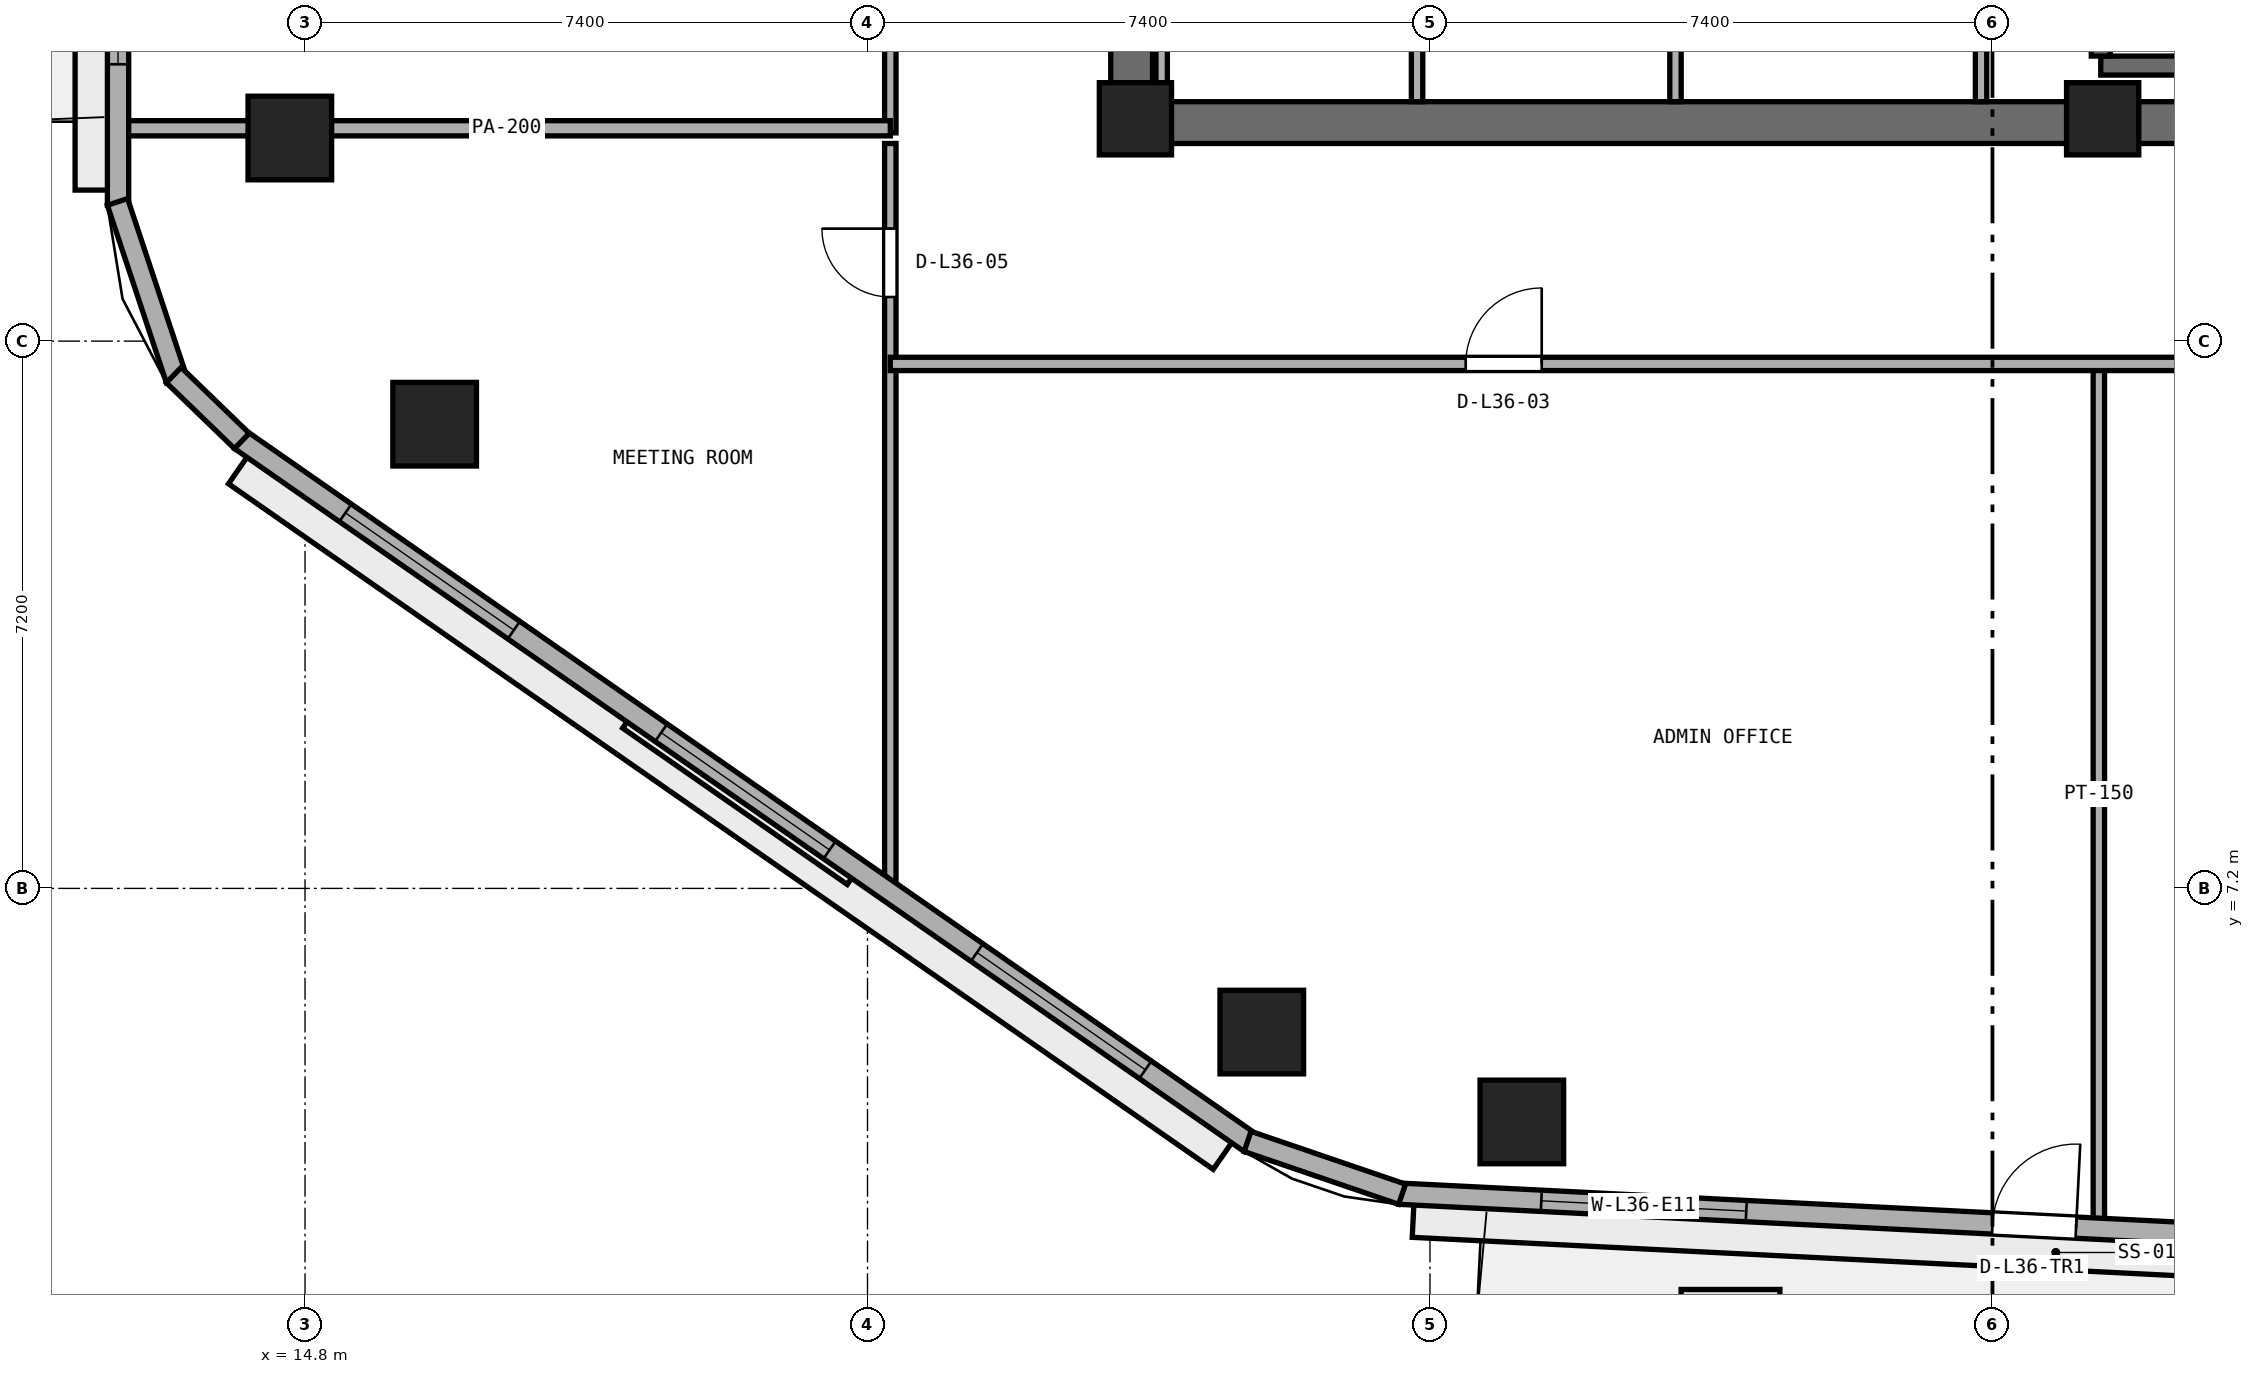
"""IFC4 building model, lengths in metres.
Left out: names, types, materials, properties, quantities, classifications, styles, units other than length and angle.
Written with IfcOpenShell. Run it as: python <this file> out.ifc"""

import sys

from ifc_helpers import new_model, si_unit, direction, frame, frame_2d, origin, origin_2d, place, context, subcontext, project, spatial, rectangle, extrude, element, fill, save


model = new_model("IFC4")
c1 = context("Model", 3, precision=1e-05, world=origin(), true_north=direction((0.0, 1.0)))
c2 = subcontext(c1, "Body", "Model", "MODEL_VIEW")
j1 = project(units=[si_unit("LENGTHUNIT", "METRE"), si_unit("PLANEANGLEUNIT", "RADIAN")], contexts=[c1])
p1 = place(None, origin())
s1 = spatial("IfcSite", under=j1, at=p1, CompositionType="ELEMENT")
p2 = place(p1, origin())
s2 = spatial("IfcBuilding", under=s1, at=p2, CompositionType="ELEMENT")
p3 = place(p2, frame((0.0, 0.0, 144.0)))
s3 = spatial("IfcBuildingStorey", under=s2, at=p3, CompositionType="ELEMENT", Elevation=144.0)
p4 = place(p3, frame((25.4, 17.275, 0.0), z_axis=(0.0, 0.0, 1.0), x_axis=(1.0, 0.0, 0.0)))
e1 = element("IfcWall", 1, at=p4, inside=s3, PredefinedType="SHEAR", context=c2, shape_type="SweptSolid", body=[
    extrude(rectangle(XDim=23.2, YDim=0.55, at=frame_2d((11.6, 0.0))), origin(), (0.0, 0.0, 1.0), 3.54),
])
p5 = place(p3, frame((25.675, 17.55, 0.0), z_axis=(0.0, 0.0, 1.0), x_axis=(0.0, 1.0, 0.0)))
e2 = element("IfcWall", 2, at=p5, inside=s3, PredefinedType="SHEAR", context=c2, shape_type="SweptSolid", body=[
    extrude(rectangle(XDim=15.3, YDim=0.55, at=frame_2d((7.65, 0.0))), origin(), (0.0, 0.0, 1.0), 3.54),
])
p6 = place(p5, frame((6.9, 0.0, 0.0)))
e3 = element("IfcOpeningElement", 3, at=p6, cuts=e2, PredefinedType="OPENING", context=c2, shape_type="SweptSolid", body=[
    extrude(rectangle(XDim=1.5, YDim=2.15, at=frame_2d((0.75, 1.075))), frame((0.0, 0.285, 0.0), z_axis=(0.0, -1.0, 0.0), x_axis=(1.0, 0.0, 0.0)), (0.0, 0.0, 1.0), 0.57),
])
for number, where, z_axis, x_axis in (
    (4, (25.725, 17.325, 0.0), (0.0, 0.0, 1.0), (1.0, 0.0, 0.0)),
    (5, (38.45, 17.325, 0.0), (0.0, 0.0, 1.0), (1.0, 0.0, 0.0)),
):
    element("IfcColumn", number, at=place(p3, frame(where, z_axis=z_axis, x_axis=x_axis)), inside=s3, PredefinedType="PILASTER", context=c2, shape_type="SweptSolid", body=[
        extrude(rectangle(XDim=0.95, YDim=0.95, at=origin_2d()), origin(), (0.0, 0.0, 1.0), 3.8),
    ])
for number, where, z_axis, x_axis in (
    (6, (30.809, 4.127, 0.0), (0.0, 0.0, 1.0), (1.0, 0.0, 0.0)),
    (7, (14.6, 17.072, 0.0), (0.0, 0.0, 1.0), (1.0, 0.0, 0.0)),
    (8, (16.505, 13.307, 0.0), (0.0, 0.0, 1.0), (1.0, 0.0, 0.0)),
    (9, (27.387, 5.31, 0.0), (0.0, 0.0, 1.0), (1.0, 0.0, 0.0)),
):
    element("IfcColumn", number, at=place(p3, frame(where, z_axis=z_axis, x_axis=x_axis)), inside=s3, PredefinedType="COLUMN", context=c2, shape_type="SweptSolid", body=[
        extrude(rectangle(XDim=1.1, YDim=1.1, at=origin_2d()), origin(), (0.0, 0.0, 1.0), 3.8),
    ])
p7 = place(p3, frame((38.425, 18.025, 0.0), z_axis=(0.0, 0.0, 1.0), x_axis=(1.0, 0.0, 0.0)))
e10 = element("IfcWall", 10, at=p7, inside=s3, PredefinedType="SHEAR", context=c2, shape_type="SweptSolid", body=[
    extrude(rectangle(XDim=7.3, YDim=0.25, at=frame_2d((3.65, 0.0))), origin(), (0.0, 0.0, 1.0), 3.54),
])
p8 = place(p3, frame((38.425, 18.15, 0.0), z_axis=(0.0, 0.0, 1.0), x_axis=(0.0, 1.0, 0.0)))
e11 = element("IfcWall", 11, at=p8, inside=s3, PredefinedType="SHEAR", context=c2, shape_type="SweptSolid", body=[
    extrude(rectangle(XDim=3.2, YDim=0.25, at=frame_2d((1.6, 0.0))), origin(), (0.0, 0.0, 1.0), 3.54),
])
p9 = place(p8, frame((0.35, 0.0, 0.0)))
e12 = element("IfcOpeningElement", 12, at=p9, cuts=e11, PredefinedType="OPENING", context=c2, shape_type="SweptSolid", body=[
    extrude(rectangle(XDim=1.1, YDim=2.15, at=frame_2d((0.55, 1.075))), frame((0.0, 0.135, 0.0), z_axis=(0.0, -1.0, 0.0), x_axis=(1.0, 0.0, 0.0)), (0.0, 0.0, 1.0), 0.27),
])
p10 = place(p3, frame((26.07, 17.55, 0.0), z_axis=(0.0, 0.0, 1.0), x_axis=(0.0, 1.0, 0.0)))
e13 = element("IfcWall", 13, at=p10, inside=s3, PredefinedType="PARTITIONING", context=c2, shape_type="SweptSolid", body=[
    extrude(rectangle(XDim=2.2, YDim=0.15, at=frame_2d((1.1, 0.0))), origin(), (0.0, 0.0, 1.0), 2.64),
])
for number, where, z_axis, x_axis in (
    (14, (29.43, 17.55, 0.0), (0.0, 0.0, 1.0), (0.0, 1.0, 0.0)),
    (15, (32.83, 17.55, 0.0), (0.0, 0.0, 1.0), (0.0, 1.0, 0.0)),
    (16, (36.85, 17.55, 0.0), (0.0, 0.0, 1.0), (0.0, 1.0, 0.0)),
):
    element("IfcWall", number, at=place(p3, frame(where, z_axis=z_axis, x_axis=x_axis)), inside=s3, PredefinedType="PARTITIONING", context=c2, shape_type="SweptSolid", body=[
        extrude(rectangle(XDim=2.2, YDim=0.15, at=frame_2d((1.1, 0.0))), origin(), (0.0, 0.0, 1.0), 3.54),
    ])
p11 = place(p3, frame((38.4, 2.787, 0.0), z_axis=(0.0, 0.0, 1.0), x_axis=(0.0, 1.0, 0.0)))
e17 = element("IfcWall", 17, at=p11, inside=s3, PredefinedType="PARTITIONING", context=c2, shape_type="SweptSolid", body=[
    extrude(rectangle(XDim=11.313, YDim=0.15, at=frame_2d((5.657, 0.0))), origin(), (0.0, 0.0, 1.0), 3.54),
])
p12 = place(p3, frame((22.5, 7.119, 0.0), z_axis=(0.0, 0.0, 1.0), x_axis=(0.0, 1.0, 0.0)))
e18 = element("IfcWall", 18, at=p12, inside=s3, PredefinedType="PARTITIONING", context=c2, shape_type="SweptSolid", body=[
    extrude(rectangle(XDim=9.881, YDim=0.15, at=frame_2d((4.94, 0.0))), origin(), (0.0, 0.0, 1.0), 3.54),
])
p13 = place(p12, frame((7.861, 0.0, 0.0)))
e19 = element("IfcOpeningElement", 19, at=p13, cuts=e18, PredefinedType="OPENING", context=c2, shape_type="SweptSolid", body=[
    extrude(rectangle(XDim=0.9, YDim=2.1, at=frame_2d((0.45, 1.05))), frame((0.0, 0.085, 0.0), z_axis=(0.0, -1.0, 0.0), x_axis=(1.0, 0.0, 0.0)), (0.0, 0.0, 1.0), 0.17),
])
p14 = place(p3, frame((22.5, 17.14, 0.0), z_axis=(0.0, 0.0, 1.0), x_axis=(0.0, 1.0, 0.0)))
e20 = element("IfcWall", 20, at=p14, inside=s3, PredefinedType="PARTITIONING", context=c2, shape_type="SweptSolid", body=[
    extrude(rectangle(XDim=6.71, YDim=0.15, at=frame_2d((3.355, 0.0))), origin(), (0.0, 0.0, 1.0), 3.54),
])
p15 = place(p3, frame((22.5, 14.1, 0.0), z_axis=(0.0, 0.0, 1.0), x_axis=(1.0, 0.0, 0.0)))
e21 = element("IfcWall", 21, at=p15, inside=s3, PredefinedType="PARTITIONING", context=c2, shape_type="SweptSolid", body=[
    extrude(rectangle(XDim=29.0, YDim=0.175, at=frame_2d((14.5, 0.0))), origin(), (0.0, 0.0, 1.0), 3.54),
])
p16 = place(p15, frame((7.57, 0.0, 0.0)))
e22 = element("IfcOpeningElement", 22, at=p16, cuts=e21, PredefinedType="OPENING", context=c2, shape_type="SweptSolid", body=[
    extrude(rectangle(XDim=1.0, YDim=2.12, at=frame_2d((0.5, 1.06))), frame((0.0, 0.097, 0.0), z_axis=(0.0, -1.0, 0.0), x_axis=(1.0, 0.0, 0.0)), (0.0, 0.0, 1.0), 0.195),
])
p17 = place(p15, frame((21.88, 0.0, 0.0)))
e23 = element("IfcOpeningElement", 23, at=p17, cuts=e21, PredefinedType="OPENING", context=c2, shape_type="SweptSolid", body=[
    extrude(rectangle(XDim=0.9, YDim=2.1, at=frame_2d((0.45, 1.05))), frame((0.0, 0.097, 0.0), z_axis=(0.0, -1.0, 0.0), x_axis=(1.0, 0.0, 0.0)), (0.0, 0.0, 1.0), 0.195),
])
p18 = place(p3, frame((12.405, 17.2, 0.0), z_axis=(0.0, 0.0, 1.0), x_axis=(1.0, 0.0, 0.0)))
e24 = element("IfcWall", 24, at=p18, inside=s3, PredefinedType="PARTITIONING", context=c2, shape_type="SweptSolid", body=[
    extrude(rectangle(XDim=10.095, YDim=0.2, at=frame_2d((5.047, 0.0))), origin(), (0.0, 0.0, 1.0), 2.923),
])
p19 = place(p3, frame((29.195, 3.184, 0.0), z_axis=(0.0, 0.0, 1.0), x_axis=(0.998743400978, -0.05011605535, 0.0)))
e25 = element("IfcWall", 25, at=p19, inside=s3, PredefinedType="STANDARD", context=c2, shape_type="SweptSolid", body=[
    extrude(rectangle(XDim=17.333, YDim=0.28, at=frame_2d((8.667, 0.0))), origin(), (0.0, 0.0, 1.0), 3.54),
])
p20 = place(p19, frame((7.816, 0.0, 0.0)))
e26 = element("IfcOpeningElement", 26, at=p20, cuts=e25, PredefinedType="OPENING", context=c2, shape_type="SweptSolid", body=[
    extrude(rectangle(XDim=1.1, YDim=2.2, at=frame_2d((0.55, 1.1))), frame((0.0, 0.15, 0.0), z_axis=(0.0, -1.0, 0.0), x_axis=(1.0, 0.0, 0.0)), (0.0, 0.0, 1.0), 0.3),
])
p21 = place(p19, frame((1.872, 0.0, 0.9)))
e27 = element("IfcOpeningElement", 27, at=p21, cuts=e25, PredefinedType="OPENING", context=c2, shape_type="SweptSolid", body=[
    extrude(rectangle(XDim=2.7, YDim=1.75, at=frame_2d((1.35, 0.875))), frame((0.0, 0.15, 0.0), z_axis=(0.0, -1.0, 0.0), x_axis=(1.0, 0.0, 0.0)), (0.0, 0.0, 1.0), 0.3),
])
p22 = place(p19, frame((12.76, 0.0, 0.9)))
e28 = element("IfcOpeningElement", 28, at=p22, cuts=e25, PredefinedType="OPENING", context=c2, shape_type="SweptSolid", body=[
    extrude(rectangle(XDim=2.7, YDim=1.75, at=frame_2d((1.35, 0.875))), frame((0.0, 0.15, 0.0), z_axis=(0.0, -1.0, 0.0), x_axis=(1.0, 0.0, 0.0)), (0.0, 0.0, 1.0), 0.3),
])
p23 = place(p3, frame((12.34, 33.419, 0.0), z_axis=(0.0, 0.0, 1.0), x_axis=(0.0, -1.0, 0.0)))
e29 = element("IfcWall", 29, at=p23, inside=s3, PredefinedType="STANDARD", context=c2, shape_type="SweptSolid", body=[
    extrude(rectangle(XDim=17.232, YDim=0.28, at=frame_2d((8.616, 0.0))), origin(), (0.0, 0.0, 1.0), 3.54),
])
p24 = place(p23, frame((8.066, 0.0, 0.0)))
e30 = element("IfcOpeningElement", 30, at=p24, cuts=e29, PredefinedType="OPENING", context=c2, shape_type="SweptSolid", body=[
    extrude(rectangle(XDim=1.1, YDim=2.2, at=frame_2d((0.55, 1.1))), frame((0.0, 0.15, 0.0), z_axis=(0.0, -1.0, 0.0), x_axis=(1.0, 0.0, 0.0)), (0.0, 0.0, 1.0), 0.3),
])
p25 = place(p23, frame((12.677, 0.0, 0.9)))
e31 = element("IfcOpeningElement", 31, at=p25, cuts=e29, PredefinedType="OPENING", context=c2, shape_type="SweptSolid", body=[
    extrude(rectangle(XDim=2.7, YDim=1.75, at=frame_2d((1.35, 0.875))), frame((0.0, 0.15, 0.0), z_axis=(0.0, -1.0, 0.0), x_axis=(1.0, 0.0, 0.0)), (0.0, 0.0, 1.0), 0.3),
])
p26 = place(p3, frame((13.952, 13.101, 0.0), z_axis=(0.0, 0.0, 1.0), x_axis=(0.820698239491, -0.571361881558, 0.0)))
e32 = element("IfcWall", 32, at=p26, inside=s3, PredefinedType="STANDARD", context=c2, shape_type="SweptSolid", body=[
    extrude(rectangle(XDim=16.186, YDim=0.28, at=frame_2d((8.093, 0.0))), origin(), (0.0, 0.0, 1.0), 3.54),
])
p27 = place(p26, frame((1.681, 0.0, 0.9)))
e33 = element("IfcOpeningElement", 33, at=p27, cuts=e32, PredefinedType="OPENING", context=c2, shape_type="SweptSolid", body=[
    extrude(rectangle(XDim=2.7, YDim=1.75, at=frame_2d((1.35, 0.875))), frame((0.0, 0.15, 0.0), z_axis=(0.0, -1.0, 0.0), x_axis=(1.0, 0.0, 0.0)), (0.0, 0.0, 1.0), 0.3),
])
p28 = place(p26, frame((6.743, 0.0, 0.9)))
e34 = element("IfcOpeningElement", 34, at=p28, cuts=e32, PredefinedType="OPENING", context=c2, shape_type="SweptSolid", body=[
    extrude(rectangle(XDim=2.7, YDim=1.75, at=frame_2d((1.35, 0.875))), frame((0.0, 0.15, 0.0), z_axis=(0.0, -1.0, 0.0), x_axis=(1.0, 0.0, 0.0)), (0.0, 0.0, 1.0), 0.3),
])
p29 = place(p26, frame((11.804, 0.0, 0.9)))
e35 = element("IfcOpeningElement", 35, at=p29, cuts=e32, PredefinedType="OPENING", context=c2, shape_type="SweptSolid", body=[
    extrude(rectangle(XDim=2.7, YDim=1.75, at=frame_2d((1.35, 0.875))), frame((0.0, 0.15, 0.0), z_axis=(0.0, -1.0, 0.0), x_axis=(1.0, 0.0, 0.0)), (0.0, 0.0, 1.0), 0.3),
])
p30 = place(p3, frame((12.333, 16.231, 0.0), z_axis=(0.0, 0.0, 1.0), x_axis=(0.315364302967, -0.94897068259, 0.0)))
e36 = element("IfcWall", 36, at=p30, inside=s3, PredefinedType="STANDARD", context=c2, shape_type="SweptSolid", body=[
    extrude(rectangle(XDim=2.46, YDim=0.28, at=frame_2d((1.23, 0.0))), origin(), (0.0, 0.0, 1.0), 3.54),
])
p31 = place(p3, frame((13.073, 13.953, 0.0), z_axis=(0.0, 0.0, 1.0), x_axis=(0.718958999036, -0.695052485576, 0.0)))
e37 = element("IfcWall", 37, at=p31, inside=s3, PredefinedType="STANDARD", context=c2, shape_type="SweptSolid", body=[
    extrude(rectangle(XDim=1.246, YDim=0.28, at=frame_2d((0.623, 0.0))), origin(), (0.0, 0.0, 1.0), 3.54),
])
p32 = place(p3, frame((27.2, 3.871, 0.0), z_axis=(0.0, 0.0, 1.0), x_axis=(0.946327814955, -0.323208395068, 0.0)))
e38 = element("IfcWall", 38, at=p32, inside=s3, PredefinedType="STANDARD", context=c2, shape_type="SweptSolid", body=[
    extrude(rectangle(XDim=2.148, YDim=0.28, at=frame_2d((1.074, 0.0))), origin(), (0.0, 0.0, 1.0), 3.54),
])
p33 = place(p16, origin())
e39 = element("IfcDoor", 39, at=p33, inside=s3, OperationType="SINGLE_SWING_RIGHT", PredefinedType="DOOR", context=c2, shape_type="SweptSolid", body=[
    extrude(rectangle(XDim=1.0, YDim=2.12, at=frame_2d((0.5, 1.06))), frame((0.0, 0.025, 0.0), z_axis=(0.0, -1.0, 0.0), x_axis=(1.0, 0.0, 0.0)), (0.0, 0.0, 1.0), 0.05),
])
fill(e22, e39)
p34 = place(p13, origin())
e40 = element("IfcDoor", 40, at=p34, inside=s3, OperationType="SINGLE_SWING_RIGHT", PredefinedType="DOOR", context=c2, shape_type="SweptSolid", body=[
    extrude(rectangle(XDim=0.9, YDim=2.1, at=frame_2d((0.45, 1.05))), frame((0.0, 0.025, 0.0), z_axis=(0.0, -1.0, 0.0), x_axis=(1.0, 0.0, 0.0)), (0.0, 0.0, 1.0), 0.05),
])
fill(e19, e40)
p35 = place(p20, origin())
e41 = element("IfcDoor", 41, at=p35, inside=s3, OperationType="SINGLE_SWING_RIGHT", PredefinedType="DOOR", context=c2, shape_type="SweptSolid", body=[
    extrude(rectangle(XDim=1.1, YDim=2.2, at=frame_2d((0.55, 1.1))), frame((0.0, 0.025, 0.0), z_axis=(0.0, -1.0, 0.0), x_axis=(1.0, 0.0, 0.0)), (0.0, 0.0, 1.0), 0.05),
])
fill(e26, e41)
p36 = place(p21, origin())
e42 = element("IfcWindow", 42, at=p36, inside=s3, PartitioningType="SINGLE_PANEL", PredefinedType="WINDOW", context=c2, shape_type="SweptSolid", body=[
    extrude(rectangle(XDim=2.7, YDim=1.75, at=frame_2d((1.35, 0.875))), frame((0.0, 0.03, 0.0), z_axis=(0.0, -1.0, 0.0), x_axis=(1.0, 0.0, 0.0)), (0.0, 0.0, 1.0), 0.06),
])
fill(e27, e42)
p37 = place(p25, origin())
e43 = element("IfcWindow", 43, at=p37, inside=s3, PartitioningType="SINGLE_PANEL", PredefinedType="WINDOW", context=c2, shape_type="SweptSolid", body=[
    extrude(rectangle(XDim=2.7, YDim=1.75, at=frame_2d((1.35, 0.875))), frame((0.0, 0.03, 0.0), z_axis=(0.0, -1.0, 0.0), x_axis=(1.0, 0.0, 0.0)), (0.0, 0.0, 1.0), 0.06),
])
fill(e31, e43)
p38 = place(p27, origin())
e44 = element("IfcWindow", 44, at=p38, inside=s3, PartitioningType="SINGLE_PANEL", PredefinedType="WINDOW", context=c2, shape_type="SweptSolid", body=[
    extrude(rectangle(XDim=2.7, YDim=1.75, at=frame_2d((1.35, 0.875))), frame((0.0, 0.03, 0.0), z_axis=(0.0, -1.0, 0.0), x_axis=(1.0, 0.0, 0.0)), (0.0, 0.0, 1.0), 0.06),
])
fill(e33, e44)
p39 = place(p28, origin())
e45 = element("IfcWindow", 45, at=p39, inside=s3, PartitioningType="SINGLE_PANEL", PredefinedType="WINDOW", context=c2, shape_type="SweptSolid", body=[
    extrude(rectangle(XDim=2.7, YDim=1.75, at=frame_2d((1.35, 0.875))), frame((0.0, 0.03, 0.0), z_axis=(0.0, -1.0, 0.0), x_axis=(1.0, 0.0, 0.0)), (0.0, 0.0, 1.0), 0.06),
])
fill(e34, e45)
p40 = place(p29, origin())
e46 = element("IfcWindow", 46, at=p40, inside=s3, PartitioningType="SINGLE_PANEL", PredefinedType="WINDOW", context=c2, shape_type="SweptSolid", body=[
    extrude(rectangle(XDim=2.7, YDim=1.75, at=frame_2d((1.35, 0.875))), frame((0.0, 0.03, 0.0), z_axis=(0.0, -1.0, 0.0), x_axis=(1.0, 0.0, 0.0)), (0.0, 0.0, 1.0), 0.06),
])
fill(e35, e46)
save(model, sys.argv[1])
